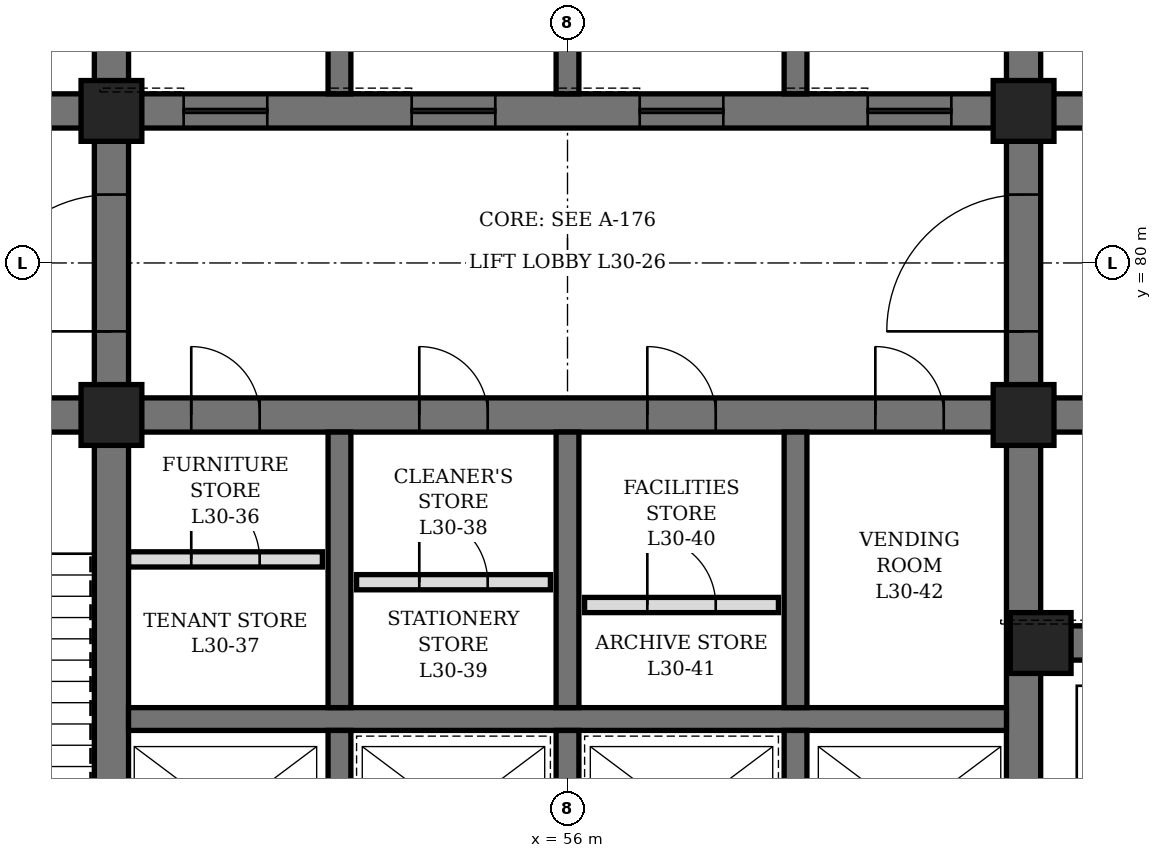
"""IFC4 building model, lengths in metres.
Left out: names, types, materials, properties, quantities, classifications, styles, units other than length and angle.
Written with IfcOpenShell. Run it as: python <this file> out.ifc"""

import sys

from ifc_helpers import new_model, si_unit, direction, frame, frame_2d, origin, origin_2d, place, context, subcontext, project, spatial, rectangle, hollow_rectangle, extrude, element, fill, save


model = new_model("IFC4")
c1 = context("Model", 3, precision=1e-05, world=origin(), true_north=direction((0.0, 1.0)))
c2 = subcontext(c1, "Body", "Model", "MODEL_VIEW")
j1 = project(units=[si_unit("LENGTHUNIT", "METRE"), si_unit("PLANEANGLEUNIT", "RADIAN")], contexts=[c1])
p1 = place(None, origin())
s1 = spatial("IfcSite", under=j1, at=p1, CompositionType="ELEMENT")
p2 = place(p1, origin())
s2 = spatial("IfcBuilding", under=s1, at=p2, CompositionType="ELEMENT")
p3 = place(p2, frame((0.0, 0.0, 137.5)))
s3 = spatial("IfcBuildingStorey", under=s2, at=p3, CompositionType="ELEMENT", Elevation=137.5)
p4 = place(p3, frame((50.0, 71.6, 0.0), z_axis=(0.0, 0.0, 1.0), x_axis=(0.0, 1.0, 0.0)))
e1 = element("IfcWall", 1, at=p4, inside=s3, PredefinedType="SHEAR", context=c2, shape_type="SweptSolid", body=[
    extrude(rectangle(XDim=16.8, YDim=0.45, at=frame_2d((8.4, 0.0))), origin(), (0.0, 0.0, 1.0), 4.2),
])
p5 = place(p4, frame((7.5, 0.0, 0.0)))
e2 = element("IfcOpeningElement", 2, at=p5, cuts=e1, PredefinedType="OPENING", context=c2, shape_type="SweptSolid", body=[
    extrude(rectangle(XDim=1.8, YDim=2.4, at=frame_2d((0.9, 1.2))), frame((0.0, 0.235, 0.0), z_axis=(0.0, -1.0, 0.0), x_axis=(1.0, 0.0, 0.0)), (0.0, 0.0, 1.0), 0.47),
])
p6 = place(p3, frame((62.0, 71.6, 0.0), z_axis=(0.0, 0.0, 1.0), x_axis=(0.0, 1.0, 0.0)))
e3 = element("IfcWall", 3, at=p6, inside=s3, PredefinedType="SHEAR", context=c2, shape_type="SweptSolid", body=[
    extrude(rectangle(XDim=16.8, YDim=0.45, at=frame_2d((8.4, 0.0))), origin(), (0.0, 0.0, 1.0), 4.2),
])
p7 = place(p6, frame((7.5, 0.0, 0.0)))
e4 = element("IfcOpeningElement", 4, at=p7, cuts=e3, PredefinedType="OPENING", context=c2, shape_type="SweptSolid", body=[
    extrude(rectangle(XDim=1.8, YDim=2.4, at=frame_2d((0.9, 1.2))), frame((0.0, 0.235, 0.0), z_axis=(0.0, -1.0, 0.0), x_axis=(1.0, 0.0, 0.0)), (0.0, 0.0, 1.0), 0.47),
])
p8 = place(p3, frame((44.6, 78.0, 0.0), z_axis=(0.0, 0.0, 1.0), x_axis=(1.0, 0.0, 0.0)))
e5 = element("IfcWall", 5, at=p8, inside=s3, PredefinedType="SHEAR", context=c2, shape_type="SweptSolid", body=[
    extrude(rectangle(XDim=5.175, YDim=0.45, at=frame_2d((2.587, 0.0))), origin(), (0.0, 0.0, 1.0), 4.2),
])
p9 = place(p8, frame((1.8, 0.0, 0.0)))
e6 = element("IfcOpeningElement", 6, at=p9, cuts=e5, PredefinedType="OPENING", context=c2, shape_type="SweptSolid", body=[
    extrude(rectangle(XDim=1.2, YDim=2.1, at=frame_2d((0.6, 1.05))), frame((0.0, 0.235, 0.0), z_axis=(0.0, -1.0, 0.0), x_axis=(1.0, 0.0, 0.0)), (0.0, 0.0, 1.0), 0.47),
])
p10 = place(p3, frame((44.6, 82.0, 0.0), z_axis=(0.0, 0.0, 1.0), x_axis=(1.0, 0.0, 0.0)))
e7 = element("IfcWall", 7, at=p10, inside=s3, PredefinedType="SHEAR", context=c2, shape_type="SweptSolid", body=[
    extrude(rectangle(XDim=5.175, YDim=0.45, at=frame_2d((2.587, 0.0))), origin(), (0.0, 0.0, 1.0), 4.2),
])
p11 = place(p10, frame((0.7, 0.0, 0.0)))
e8 = element("IfcOpeningElement", 8, at=p11, cuts=e7, PredefinedType="OPENING", context=c2, shape_type="SweptSolid", body=[
    extrude(rectangle(XDim=0.9, YDim=2.1, at=frame_2d((0.45, 1.05))), frame((0.0, 0.235, 0.0), z_axis=(0.0, -1.0, 0.0), x_axis=(1.0, 0.0, 0.0)), (0.0, 0.0, 1.0), 0.47),
])
p12 = place(p3, frame((62.225, 75.0, 0.0), z_axis=(0.0, 0.0, 1.0), x_axis=(1.0, 0.0, 0.0)))
e9 = element("IfcWall", 9, at=p12, inside=s3, PredefinedType="SHEAR", context=c2, shape_type="SweptSolid", body=[
    extrude(rectangle(XDim=5.175, YDim=0.45, at=frame_2d((2.587, 0.0))), origin(), (0.0, 0.0, 1.0), 4.2),
])
p13 = place(p12, frame((0.675, 0.0, 0.0)))
e10 = element("IfcOpeningElement", 10, at=p13, cuts=e9, PredefinedType="OPENING", context=c2, shape_type="SweptSolid", body=[
    extrude(rectangle(XDim=1.2, YDim=2.2, at=frame_2d((0.6, 1.1))), frame((0.0, 0.235, 0.0), z_axis=(0.0, -1.0, 0.0), x_axis=(1.0, 0.0, 0.0)), (0.0, 0.0, 1.0), 0.47),
])
p14 = place(p12, frame((3.425, 0.0, 0.0)))
e11 = element("IfcOpeningElement", 11, at=p14, cuts=e9, PredefinedType="OPENING", context=c2, shape_type="SweptSolid", body=[
    extrude(rectangle(XDim=1.2, YDim=2.2, at=frame_2d((0.6, 1.1))), frame((0.0, 0.235, 0.0), z_axis=(0.0, -1.0, 0.0), x_axis=(1.0, 0.0, 0.0)), (0.0, 0.0, 1.0), 0.47),
])
p15 = place(p3, frame((62.225, 78.0, 0.0), z_axis=(0.0, 0.0, 1.0), x_axis=(1.0, 0.0, 0.0)))
e12 = element("IfcWall", 12, at=p15, inside=s3, PredefinedType="SHEAR", context=c2, shape_type="SweptSolid", body=[
    extrude(rectangle(XDim=5.175, YDim=0.45, at=frame_2d((2.587, 0.0))), origin(), (0.0, 0.0, 1.0), 4.2),
])
p16 = place(p15, frame((2.175, 0.0, 0.0)))
e13 = element("IfcOpeningElement", 13, at=p16, cuts=e12, PredefinedType="OPENING", context=c2, shape_type="SweptSolid", body=[
    extrude(rectangle(XDim=1.2, YDim=2.1, at=frame_2d((0.6, 1.05))), frame((0.0, 0.235, 0.0), z_axis=(0.0, -1.0, 0.0), x_axis=(1.0, 0.0, 0.0)), (0.0, 0.0, 1.0), 0.47),
])
p17 = place(p3, frame((62.225, 82.0, 0.0), z_axis=(0.0, 0.0, 1.0), x_axis=(1.0, 0.0, 0.0)))
e14 = element("IfcWall", 14, at=p17, inside=s3, PredefinedType="SHEAR", context=c2, shape_type="SweptSolid", body=[
    extrude(rectangle(XDim=5.175, YDim=0.45, at=frame_2d((2.587, 0.0))), origin(), (0.0, 0.0, 1.0), 4.2),
])
p18 = place(p17, frame((2.175, 0.0, 0.0)))
e15 = element("IfcOpeningElement", 15, at=p18, cuts=e14, PredefinedType="OPENING", context=c2, shape_type="SweptSolid", body=[
    extrude(rectangle(XDim=1.2, YDim=2.1, at=frame_2d((0.6, 1.05))), frame((0.0, 0.235, 0.0), z_axis=(0.0, -1.0, 0.0), x_axis=(1.0, 0.0, 0.0)), (0.0, 0.0, 1.0), 0.47),
])
p19 = place(p3, frame((50.225, 78.0, 0.0), z_axis=(0.0, 0.0, 1.0), x_axis=(1.0, 0.0, 0.0)))
e16 = element("IfcWall", 16, at=p19, inside=s3, PredefinedType="SHEAR", context=c2, shape_type="SweptSolid", body=[
    extrude(rectangle(XDim=11.55, YDim=0.45, at=frame_2d((5.775, 0.0))), origin(), (0.0, 0.0, 1.0), 4.2),
])
p20 = place(p19, frame((0.825, 0.0, 0.0)))
e17 = element("IfcOpeningElement", 17, at=p20, cuts=e16, PredefinedType="OPENING", context=c2, shape_type="SweptSolid", body=[
    extrude(rectangle(XDim=0.9, YDim=2.1, at=frame_2d((0.45, 1.05))), frame((0.0, 0.235, 0.0), z_axis=(0.0, -1.0, 0.0), x_axis=(1.0, 0.0, 0.0)), (0.0, 0.0, 1.0), 0.47),
])
p21 = place(p19, frame((3.825, 0.0, 0.0)))
e18 = element("IfcOpeningElement", 18, at=p21, cuts=e16, PredefinedType="OPENING", context=c2, shape_type="SweptSolid", body=[
    extrude(rectangle(XDim=0.9, YDim=2.1, at=frame_2d((0.45, 1.05))), frame((0.0, 0.235, 0.0), z_axis=(0.0, -1.0, 0.0), x_axis=(1.0, 0.0, 0.0)), (0.0, 0.0, 1.0), 0.47),
])
p22 = place(p19, frame((6.825, 0.0, 0.0)))
e19 = element("IfcOpeningElement", 19, at=p22, cuts=e16, PredefinedType="OPENING", context=c2, shape_type="SweptSolid", body=[
    extrude(rectangle(XDim=0.9, YDim=2.1, at=frame_2d((0.45, 1.05))), frame((0.0, 0.235, 0.0), z_axis=(0.0, -1.0, 0.0), x_axis=(1.0, 0.0, 0.0)), (0.0, 0.0, 1.0), 0.47),
])
p23 = place(p19, frame((9.825, 0.0, 0.0)))
e20 = element("IfcOpeningElement", 20, at=p23, cuts=e16, PredefinedType="OPENING", context=c2, shape_type="SweptSolid", body=[
    extrude(rectangle(XDim=0.9, YDim=2.1, at=frame_2d((0.45, 1.05))), frame((0.0, 0.235, 0.0), z_axis=(0.0, -1.0, 0.0), x_axis=(1.0, 0.0, 0.0)), (0.0, 0.0, 1.0), 0.47),
])
p24 = place(p3, frame((50.225, 82.0, 0.0), z_axis=(0.0, 0.0, 1.0), x_axis=(1.0, 0.0, 0.0)))
e21 = element("IfcWall", 21, at=p24, inside=s3, PredefinedType="SHEAR", context=c2, shape_type="SweptSolid", body=[
    extrude(rectangle(XDim=11.55, YDim=0.45, at=frame_2d((5.775, 0.0))), origin(), (0.0, 0.0, 1.0), 4.2),
])
p25 = place(p24, frame((0.725, 0.0, 0.0)))
e22 = element("IfcOpeningElement", 22, at=p25, cuts=e21, PredefinedType="OPENING", context=c2, shape_type="SweptSolid", body=[
    extrude(rectangle(XDim=1.1, YDim=2.2, at=frame_2d((0.55, 1.1))), frame((0.0, 0.235, 0.0), z_axis=(0.0, -1.0, 0.0), x_axis=(1.0, 0.0, 0.0)), (0.0, 0.0, 1.0), 0.47),
])
p26 = place(p24, frame((3.725, 0.0, 0.0)))
e23 = element("IfcOpeningElement", 23, at=p26, cuts=e21, PredefinedType="OPENING", context=c2, shape_type="SweptSolid", body=[
    extrude(rectangle(XDim=1.1, YDim=2.2, at=frame_2d((0.55, 1.1))), frame((0.0, 0.235, 0.0), z_axis=(0.0, -1.0, 0.0), x_axis=(1.0, 0.0, 0.0)), (0.0, 0.0, 1.0), 0.47),
])
p27 = place(p24, frame((6.725, 0.0, 0.0)))
e24 = element("IfcOpeningElement", 24, at=p27, cuts=e21, PredefinedType="OPENING", context=c2, shape_type="SweptSolid", body=[
    extrude(rectangle(XDim=1.1, YDim=2.2, at=frame_2d((0.55, 1.1))), frame((0.0, 0.235, 0.0), z_axis=(0.0, -1.0, 0.0), x_axis=(1.0, 0.0, 0.0)), (0.0, 0.0, 1.0), 0.47),
])
p28 = place(p24, frame((9.725, 0.0, 0.0)))
e25 = element("IfcOpeningElement", 25, at=p28, cuts=e21, PredefinedType="OPENING", context=c2, shape_type="SweptSolid", body=[
    extrude(rectangle(XDim=1.1, YDim=2.2, at=frame_2d((0.55, 1.1))), frame((0.0, 0.235, 0.0), z_axis=(0.0, -1.0, 0.0), x_axis=(1.0, 0.0, 0.0)), (0.0, 0.0, 1.0), 0.47),
])
p29 = place(p3, frame((50.225, 74.0, 0.0), z_axis=(0.0, 0.0, 1.0), x_axis=(1.0, 0.0, 0.0)))
e26 = element("IfcWall", 26, at=p29, inside=s3, PredefinedType="SHEAR", context=c2, shape_type="SweptSolid", body=[
    extrude(rectangle(XDim=11.55, YDim=0.3, at=frame_2d((5.775, 0.0))), origin(), (0.0, 0.0, 1.0), 4.2),
])
p30 = place(p3, frame((53.0, 71.6, 0.0), z_axis=(0.0, 0.0, 1.0), x_axis=(0.0, 1.0, 0.0)))
e27 = element("IfcWall", 27, at=p30, inside=s3, PredefinedType="SHEAR", context=c2, shape_type="SweptSolid", body=[
    extrude(rectangle(XDim=2.25, YDim=0.3, at=frame_2d((1.125, 0.0))), origin(), (0.0, 0.0, 1.0), 4.2),
])
p31 = place(p3, frame((53.0, 74.15, 0.0), z_axis=(0.0, 0.0, 1.0), x_axis=(0.0, 1.0, 0.0)))
e28 = element("IfcWall", 28, at=p31, inside=s3, PredefinedType="SHEAR", context=c2, shape_type="SweptSolid", body=[
    extrude(rectangle(XDim=3.625, YDim=0.3, at=frame_2d((1.812, 0.0))), origin(), (0.0, 0.0, 1.0), 4.2),
])
p32 = place(p3, frame((53.0, 82.225, 0.0), z_axis=(0.0, 0.0, 1.0), x_axis=(0.0, 1.0, 0.0)))
e29 = element("IfcWall", 29, at=p32, inside=s3, PredefinedType="SHEAR", context=c2, shape_type="SweptSolid", body=[
    extrude(rectangle(XDim=3.55, YDim=0.3, at=frame_2d((1.775, 0.0))), origin(), (0.0, 0.0, 1.0), 4.2),
])
p33 = place(p3, frame((56.0, 71.6, 0.0), z_axis=(0.0, 0.0, 1.0), x_axis=(0.0, 1.0, 0.0)))
e30 = element("IfcWall", 30, at=p33, inside=s3, PredefinedType="SHEAR", context=c2, shape_type="SweptSolid", body=[
    extrude(rectangle(XDim=2.25, YDim=0.3, at=frame_2d((1.125, 0.0))), origin(), (0.0, 0.0, 1.0), 4.2),
])
p34 = place(p3, frame((56.0, 74.15, 0.0), z_axis=(0.0, 0.0, 1.0), x_axis=(0.0, 1.0, 0.0)))
e31 = element("IfcWall", 31, at=p34, inside=s3, PredefinedType="SHEAR", context=c2, shape_type="SweptSolid", body=[
    extrude(rectangle(XDim=3.625, YDim=0.3, at=frame_2d((1.812, 0.0))), origin(), (0.0, 0.0, 1.0), 4.2),
])
p35 = place(p3, frame((56.0, 82.225, 0.0), z_axis=(0.0, 0.0, 1.0), x_axis=(0.0, 1.0, 0.0)))
e32 = element("IfcWall", 32, at=p35, inside=s3, PredefinedType="SHEAR", context=c2, shape_type="SweptSolid", body=[
    extrude(rectangle(XDim=3.55, YDim=0.3, at=frame_2d((1.775, 0.0))), origin(), (0.0, 0.0, 1.0), 4.2),
])
p36 = place(p3, frame((59.0, 71.6, 0.0), z_axis=(0.0, 0.0, 1.0), x_axis=(0.0, 1.0, 0.0)))
e33 = element("IfcWall", 33, at=p36, inside=s3, PredefinedType="SHEAR", context=c2, shape_type="SweptSolid", body=[
    extrude(rectangle(XDim=2.25, YDim=0.3, at=frame_2d((1.125, 0.0))), origin(), (0.0, 0.0, 1.0), 4.2),
])
p37 = place(p3, frame((59.0, 74.15, 0.0), z_axis=(0.0, 0.0, 1.0), x_axis=(0.0, 1.0, 0.0)))
e34 = element("IfcWall", 34, at=p37, inside=s3, PredefinedType="SHEAR", context=c2, shape_type="SweptSolid", body=[
    extrude(rectangle(XDim=3.625, YDim=0.3, at=frame_2d((1.812, 0.0))), origin(), (0.0, 0.0, 1.0), 4.2),
])
p38 = place(p3, frame((59.0, 82.225, 0.0), z_axis=(0.0, 0.0, 1.0), x_axis=(0.0, 1.0, 0.0)))
e35 = element("IfcWall", 35, at=p38, inside=s3, PredefinedType="SHEAR", context=c2, shape_type="SweptSolid", body=[
    extrude(rectangle(XDim=3.55, YDim=0.3, at=frame_2d((1.775, 0.0))), origin(), (0.0, 0.0, 1.0), 4.2),
])
for number, where, z_axis, x_axis in (
    (36, (50.0, 78.0, 0.0), (0.0, 0.0, 1.0), (1.0, 0.0, 0.0)),
    (37, (50.0, 82.0, 0.0), (0.0, 0.0, 1.0), (1.0, 0.0, 0.0)),
    (38, (62.0, 78.0, 0.0), (0.0, 0.0, 1.0), (1.0, 0.0, 0.0)),
    (39, (62.0, 82.0, 0.0), (0.0, 0.0, 1.0), (1.0, 0.0, 0.0)),
    (40, (62.225, 75.0, 0.0), (0.0, 0.0, 1.0), (1.0, 0.0, 0.0)),
):
    element("IfcColumn", number, at=place(p3, frame(where, z_axis=z_axis, x_axis=x_axis)), inside=s3, PredefinedType="COLUMN", context=c2, shape_type="SweptSolid", body=[
        extrude(hollow_rectangle(XDim=0.8, YDim=0.8, WallThickness=0.1, at=origin_2d()), origin(), (0.0, 0.0, 1.0), 4.2),
    ])
p39 = place(p3, frame((50.225, 76.1, 0.0), z_axis=(0.0, 0.0, 1.0), x_axis=(1.0, 0.0, 0.0)))
e41 = element("IfcWall", 41, at=p39, inside=s3, PredefinedType="PARTITIONING", context=c2, shape_type="SweptSolid", body=[
    extrude(rectangle(XDim=2.55, YDim=0.2, at=frame_2d((1.275, 0.0))), origin(), (0.0, 0.0, 1.0), 4.04),
])
p40 = place(p39, frame((0.825, 0.0, 0.0)))
e42 = element("IfcOpeningElement", 42, at=p40, cuts=e41, PredefinedType="OPENING", context=c2, shape_type="SweptSolid", body=[
    extrude(rectangle(XDim=0.9, YDim=2.1, at=frame_2d((0.45, 1.05))), frame((0.0, 0.11, 0.0), z_axis=(0.0, -1.0, 0.0), x_axis=(1.0, 0.0, 0.0)), (0.0, 0.0, 1.0), 0.22),
])
p41 = place(p3, frame((53.225, 75.8, 0.0), z_axis=(0.0, 0.0, 1.0), x_axis=(1.0, 0.0, 0.0)))
e43 = element("IfcWall", 43, at=p41, inside=s3, PredefinedType="PARTITIONING", context=c2, shape_type="SweptSolid", body=[
    extrude(rectangle(XDim=2.55, YDim=0.2, at=frame_2d((1.275, 0.0))), origin(), (0.0, 0.0, 1.0), 4.04),
])
p42 = place(p41, frame((0.825, 0.0, 0.0)))
e44 = element("IfcOpeningElement", 44, at=p42, cuts=e43, PredefinedType="OPENING", context=c2, shape_type="SweptSolid", body=[
    extrude(rectangle(XDim=0.9, YDim=2.1, at=frame_2d((0.45, 1.05))), frame((0.0, 0.11, 0.0), z_axis=(0.0, -1.0, 0.0), x_axis=(1.0, 0.0, 0.0)), (0.0, 0.0, 1.0), 0.22),
])
p43 = place(p3, frame((56.225, 75.5, 0.0), z_axis=(0.0, 0.0, 1.0), x_axis=(1.0, 0.0, 0.0)))
e45 = element("IfcWall", 45, at=p43, inside=s3, PredefinedType="PARTITIONING", context=c2, shape_type="SweptSolid", body=[
    extrude(rectangle(XDim=2.55, YDim=0.2, at=frame_2d((1.275, 0.0))), origin(), (0.0, 0.0, 1.0), 4.04),
])
p44 = place(p43, frame((0.825, 0.0, 0.0)))
e46 = element("IfcOpeningElement", 46, at=p44, cuts=e45, PredefinedType="OPENING", context=c2, shape_type="SweptSolid", body=[
    extrude(rectangle(XDim=0.9, YDim=2.1, at=frame_2d((0.45, 1.05))), frame((0.0, 0.11, 0.0), z_axis=(0.0, -1.0, 0.0), x_axis=(1.0, 0.0, 0.0)), (0.0, 0.0, 1.0), 0.22),
])
p45 = place(p20, origin())
e47 = element("IfcDoor", 47, at=p45, inside=s3, OperationType="SINGLE_SWING_LEFT", PredefinedType="DOOR", context=c2, shape_type="SweptSolid", body=[
    extrude(rectangle(XDim=0.9, YDim=2.1, at=frame_2d((0.45, 1.05))), frame((0.0, 0.225, 0.0), z_axis=(0.0, -1.0, 0.0), x_axis=(1.0, 0.0, 0.0)), (0.0, 0.0, 1.0), 0.449),
])
fill(e17, e47)
p46 = place(p40, origin())
e48 = element("IfcDoor", 48, at=p46, inside=s3, OperationType="SINGLE_SWING_LEFT", PredefinedType="DOOR", context=c2, shape_type="SweptSolid", body=[
    extrude(rectangle(XDim=0.9, YDim=2.1, at=frame_2d((0.45, 1.05))), frame((0.0, 0.1, 0.0), z_axis=(0.0, -1.0, 0.0), x_axis=(1.0, 0.0, 0.0)), (0.0, 0.0, 1.0), 0.199),
])
fill(e42, e48)
p47 = place(p21, origin())
e49 = element("IfcDoor", 49, at=p47, inside=s3, OperationType="SINGLE_SWING_LEFT", PredefinedType="DOOR", context=c2, shape_type="SweptSolid", body=[
    extrude(rectangle(XDim=0.9, YDim=2.1, at=frame_2d((0.45, 1.05))), frame((0.0, 0.225, 0.0), z_axis=(0.0, -1.0, 0.0), x_axis=(1.0, 0.0, 0.0)), (0.0, 0.0, 1.0), 0.449),
])
fill(e18, e49)
p48 = place(p42, origin())
e50 = element("IfcDoor", 50, at=p48, inside=s3, OperationType="SINGLE_SWING_LEFT", PredefinedType="DOOR", context=c2, shape_type="SweptSolid", body=[
    extrude(rectangle(XDim=0.9, YDim=2.1, at=frame_2d((0.45, 1.05))), frame((0.0, 0.1, 0.0), z_axis=(0.0, -1.0, 0.0), x_axis=(1.0, 0.0, 0.0)), (0.0, 0.0, 1.0), 0.199),
])
fill(e44, e50)
p49 = place(p22, origin())
e51 = element("IfcDoor", 51, at=p49, inside=s3, OperationType="SINGLE_SWING_LEFT", PredefinedType="DOOR", context=c2, shape_type="SweptSolid", body=[
    extrude(rectangle(XDim=0.9, YDim=2.1, at=frame_2d((0.45, 1.05))), frame((0.0, 0.225, 0.0), z_axis=(0.0, -1.0, 0.0), x_axis=(1.0, 0.0, 0.0)), (0.0, 0.0, 1.0), 0.449),
])
fill(e19, e51)
p50 = place(p44, origin())
e52 = element("IfcDoor", 52, at=p50, inside=s3, OperationType="SINGLE_SWING_LEFT", PredefinedType="DOOR", context=c2, shape_type="SweptSolid", body=[
    extrude(rectangle(XDim=0.9, YDim=2.1, at=frame_2d((0.45, 1.05))), frame((0.0, 0.1, 0.0), z_axis=(0.0, -1.0, 0.0), x_axis=(1.0, 0.0, 0.0)), (0.0, 0.0, 1.0), 0.199),
])
fill(e46, e52)
p51 = place(p23, origin())
e53 = element("IfcDoor", 53, at=p51, inside=s3, OperationType="SINGLE_SWING_LEFT", PredefinedType="DOOR", context=c2, shape_type="SweptSolid", body=[
    extrude(rectangle(XDim=0.9, YDim=2.1, at=frame_2d((0.45, 1.05))), frame((0.0, 0.225, 0.0), z_axis=(0.0, -1.0, 0.0), x_axis=(1.0, 0.0, 0.0)), (0.0, 0.0, 1.0), 0.449),
])
fill(e20, e53)
p52 = place(p5, origin())
e54 = element("IfcDoor", 54, at=p52, inside=s3, OperationType="DOUBLE_DOOR_SINGLE_SWING", PredefinedType="DOOR", context=c2, shape_type="SweptSolid", body=[
    extrude(rectangle(XDim=1.8, YDim=2.4, at=frame_2d((0.9, 1.2))), frame((0.0, 0.225, 0.0), z_axis=(0.0, -1.0, 0.0), x_axis=(1.0, 0.0, 0.0)), (0.0, 0.0, 1.0), 0.449),
])
fill(e2, e54)
p53 = place(p7, origin())
e55 = element("IfcDoor", 55, at=p53, inside=s3, OperationType="DOUBLE_DOOR_SINGLE_SWING", PredefinedType="DOOR", context=c2, shape_type="SweptSolid", body=[
    extrude(rectangle(XDim=1.8, YDim=2.4, at=frame_2d((0.9, 1.2))), frame((0.0, 0.225, 0.0), z_axis=(0.0, -1.0, 0.0), x_axis=(1.0, 0.0, 0.0)), (0.0, 0.0, 1.0), 0.449),
])
fill(e4, e55)
p54 = place(p25, origin())
e56 = element("IfcDoor", 56, at=p54, inside=s3, OperationType="SLIDING_TO_LEFT", PredefinedType="DOOR", context=c2, shape_type="SweptSolid", body=[
    extrude(rectangle(XDim=1.1, YDim=2.2, at=frame_2d((0.55, 1.1))), frame((0.0, 0.225, 0.0), z_axis=(0.0, -1.0, 0.0), x_axis=(1.0, 0.0, 0.0)), (0.0, 0.0, 1.0), 0.449),
])
fill(e22, e56)
p55 = place(p26, origin())
e57 = element("IfcDoor", 57, at=p55, inside=s3, OperationType="SLIDING_TO_LEFT", PredefinedType="DOOR", context=c2, shape_type="SweptSolid", body=[
    extrude(rectangle(XDim=1.1, YDim=2.2, at=frame_2d((0.55, 1.1))), frame((0.0, 0.225, 0.0), z_axis=(0.0, -1.0, 0.0), x_axis=(1.0, 0.0, 0.0)), (0.0, 0.0, 1.0), 0.449),
])
fill(e23, e57)
p56 = place(p27, origin())
e58 = element("IfcDoor", 58, at=p56, inside=s3, OperationType="SLIDING_TO_LEFT", PredefinedType="DOOR", context=c2, shape_type="SweptSolid", body=[
    extrude(rectangle(XDim=1.1, YDim=2.2, at=frame_2d((0.55, 1.1))), frame((0.0, 0.225, 0.0), z_axis=(0.0, -1.0, 0.0), x_axis=(1.0, 0.0, 0.0)), (0.0, 0.0, 1.0), 0.449),
])
fill(e24, e58)
p57 = place(p28, origin())
e59 = element("IfcDoor", 59, at=p57, inside=s3, OperationType="SLIDING_TO_LEFT", PredefinedType="DOOR", context=c2, shape_type="SweptSolid", body=[
    extrude(rectangle(XDim=1.1, YDim=2.2, at=frame_2d((0.55, 1.1))), frame((0.0, 0.225, 0.0), z_axis=(0.0, -1.0, 0.0), x_axis=(1.0, 0.0, 0.0)), (0.0, 0.0, 1.0), 0.449),
])
fill(e25, e59)
save(model, sys.argv[1])
